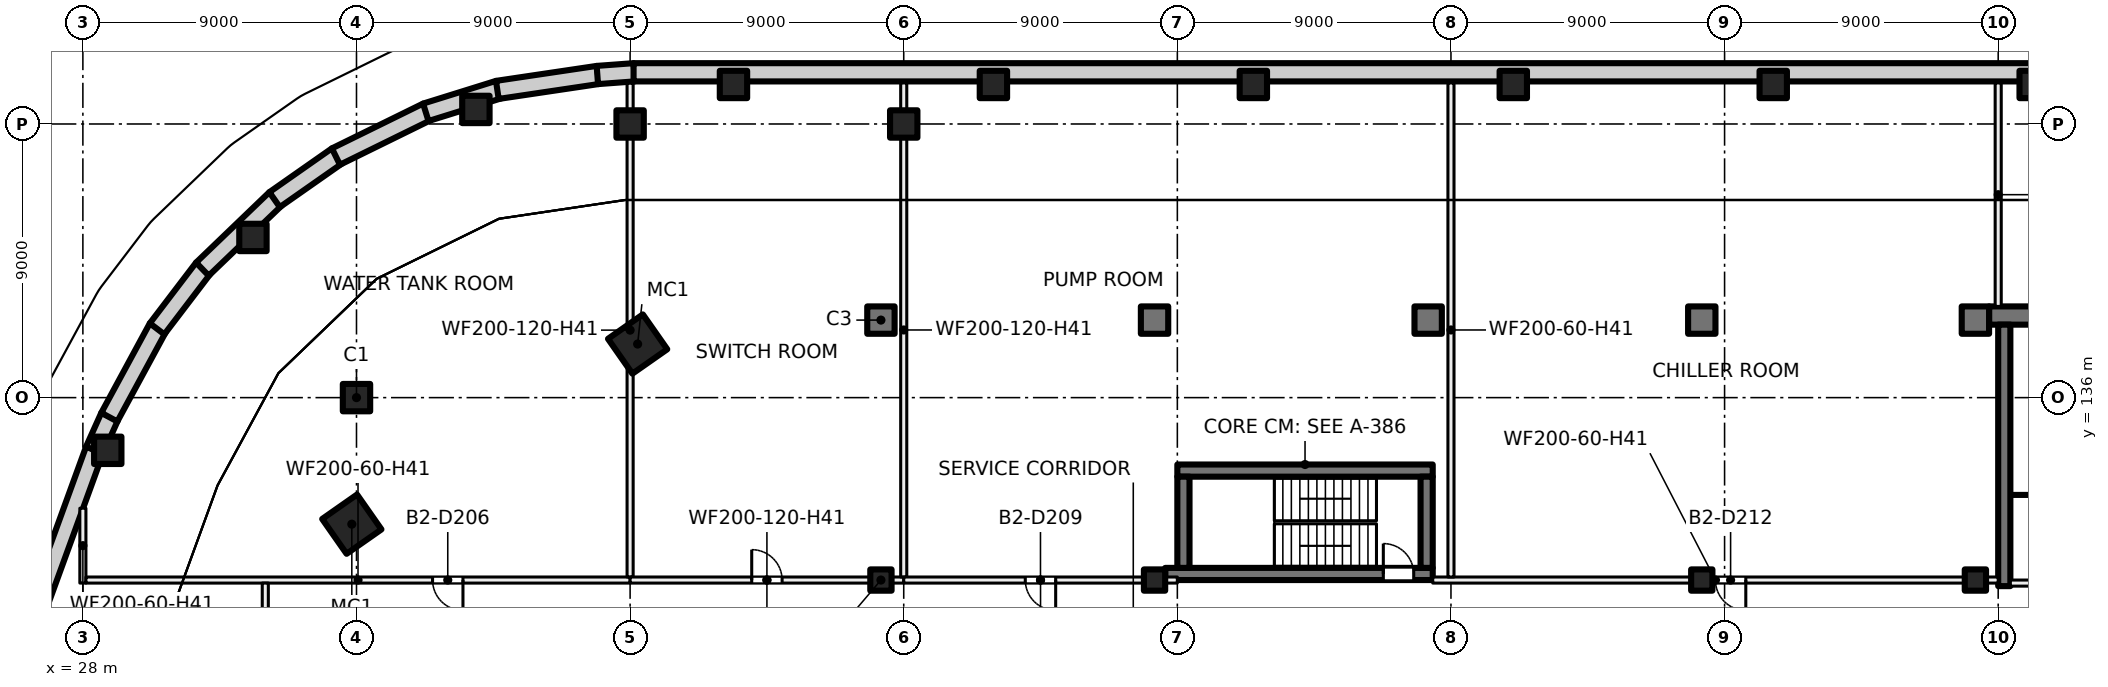
"""IFC4 building model, lengths in metres.
Left out: names, types, materials, properties, quantities, classifications, styles, units other than length and angle.
Written with IfcOpenShell. Run it as: python <this file> out.ifc"""

import sys

from ifc_helpers import new_model, si_unit, direction, frame, frame_2d, origin, origin_2d, place, context, subcontext, project, spatial, rectangle, hollow_rectangle, extrude, element, fill, save


model = new_model("IFC4")
c1 = context("Model", 3, precision=1e-05, world=origin(), true_north=direction((0.0, 1.0)))
c2 = subcontext(c1, "Body", "Model", "MODEL_VIEW")
j1 = project(units=[si_unit("LENGTHUNIT", "METRE"), si_unit("PLANEANGLEUNIT", "RADIAN")], contexts=[c1])
p1 = place(None, origin())
s1 = spatial("IfcSite", under=j1, at=p1, CompositionType="ELEMENT")
p2 = place(p1, origin())
s2 = spatial("IfcBuilding", under=s1, at=p2, CompositionType="ELEMENT")
p3 = place(p2, frame((0.0, 0.0, -9.0)))
s3 = spatial("IfcBuildingStorey", under=s2, at=p3, CompositionType="ELEMENT", Elevation=-9.0)
p4 = place(p3, frame((12.199, 89.809, 0.0), z_axis=(0.0, 0.0, 1.0), x_axis=(0.342018444468, 0.939693239118, 0.0)))
e1 = element("IfcWall", 1, at=p4, inside=s3, PredefinedType="SHEAR", context=c2, shape_type="SweptSolid", body=[
    extrude(rectangle(XDim=47.334, YDim=0.6, at=frame_2d((23.667, 0.0))), origin(), (0.0, 0.0, 1.0), 4.5),
])
p5 = place(p3, frame((28.38, 134.268, 0.0), z_axis=(0.0, 0.0, 1.0), x_axis=(0.410489806774, 0.911865186601, 0.0)))
e2 = element("IfcWall", 2, at=p5, inside=s3, PredefinedType="SHEAR", context=c2, shape_type="SweptSolid", body=[
    extrude(rectangle(XDim=1.217, YDim=0.6, at=frame_2d((0.608, 0.0))), origin(), (0.0, 0.0, 1.0), 4.5),
])
p6 = place(p3, frame((28.87, 135.358, 0.0), z_axis=(0.0, 0.0, 1.0), x_axis=(0.476454595908, 0.879199077591, 0.0)))
e3 = element("IfcWall", 3, at=p6, inside=s3, PredefinedType="SHEAR", context=c2, shape_type="SweptSolid", body=[
    extrude(rectangle(XDim=3.349, YDim=0.6, at=frame_2d((1.674, 0.0))), origin(), (0.0, 0.0, 1.0), 4.5),
])
p7 = place(p3, frame((30.441, 138.263, 0.0), z_axis=(0.0, 0.0, 1.0), x_axis=(0.606063715653, 0.79541610027, 0.0)))
e4 = element("IfcWall", 4, at=p7, inside=s3, PredefinedType="SHEAR", context=c2, shape_type="SweptSolid", body=[
    extrude(rectangle(XDim=2.512, YDim=0.6, at=frame_2d((1.256, 0.0))), origin(), (0.0, 0.0, 1.0), 4.5),
])
p8 = place(p3, frame((31.932, 140.226, 0.0), z_axis=(0.0, 0.0, 1.0), x_axis=(0.721212073243, 0.692714331747, 0.0)))
e5 = element("IfcWall", 5, at=p8, inside=s3, PredefinedType="SHEAR", context=c2, shape_type="SweptSolid", body=[
    extrude(rectangle(XDim=3.341, YDim=0.6, at=frame_2d((1.67, 0.0))), origin(), (0.0, 0.0, 1.0), 4.5),
])
p9 = place(p3, frame((34.306, 142.511, 0.0), z_axis=(0.0, 0.0, 1.0), x_axis=(0.819136010061, 0.57359933492, 0.0)))
e6 = element("IfcWall", 6, at=p9, inside=s3, PredefinedType="SHEAR", context=c2, shape_type="SweptSolid", body=[
    extrude(rectangle(XDim=2.512, YDim=0.6, at=frame_2d((1.256, 0.0))), origin(), (0.0, 0.0, 1.0), 4.5),
])
p10 = place(p3, frame((36.323, 143.928, 0.0), z_axis=(0.0, 0.0, 1.0), x_axis=(0.897590342017, 0.440830554656, 0.0)))
e7 = element("IfcWall", 7, at=p10, inside=s3, PredefinedType="SHEAR", context=c2, shape_type="SweptSolid", body=[
    extrude(rectangle(XDim=3.341, YDim=0.6, at=frame_2d((1.671, 0.0))), origin(), (0.0, 0.0, 1.0), 4.5),
])
p11 = place(p3, frame((39.28, 145.384, 0.0), z_axis=(0.0, 0.0, 1.0), x_axis=(0.954711451083, 0.297533267335, 0.0)))
e8 = element("IfcWall", 8, at=p11, inside=s3, PredefinedType="SHEAR", context=c2, shape_type="SweptSolid", body=[
    extrude(rectangle(XDim=2.512, YDim=0.6, at=frame_2d((1.256, 0.0))), origin(), (0.0, 0.0, 1.0), 4.5),
])
p12 = place(p3, frame((41.632, 146.121, 0.0), z_axis=(0.0, 0.0, 1.0), x_axis=(0.989117960185, 0.14712464389, 0.0)))
e9 = element("IfcWall", 9, at=p12, inside=s3, PredefinedType="SHEAR", context=c2, shape_type="SweptSolid", body=[
    extrude(rectangle(XDim=3.349, YDim=0.6, at=frame_2d((1.674, 0.0))), origin(), (0.0, 0.0, 1.0), 4.5),
])
p13 = place(p3, frame((44.923, 146.611, 0.0), z_axis=(0.0, 0.0, 1.0), x_axis=(0.99726994401, 0.073842120603, 0.0)))
e10 = element("IfcWall", 10, at=p13, inside=s3, PredefinedType="SHEAR", context=c2, shape_type="SweptSolid", body=[
    extrude(rectangle(XDim=1.217, YDim=0.6, at=frame_2d((0.608, 0.0))), origin(), (0.0, 0.0, 1.0), 4.5),
])
p14 = place(p3, frame((46.114, 146.7, 0.0), z_axis=(0.0, 0.0, 1.0), x_axis=(1.0, 0.0, 0.0)))
e11 = element("IfcWall", 11, at=p14, inside=s3, PredefinedType="SHEAR", context=c2, shape_type="SweptSolid", body=[
    extrude(rectangle(XDim=59.364, YDim=0.6, at=frame_2d((29.682, 0.0))), origin(), (0.0, 0.0, 1.0), 4.5),
])
for number, where, z_axis, x_axis in (
    (12, (37.0, 136.0, 0.0), (0.0, 0.0, 1.0), (1.0, 0.0, 0.0)),
    (13, (46.0, 145.0, 0.0), (0.0, 0.0, 1.0), (1.0, 0.0, 0.0)),
    (14, (55.0, 145.0, 0.0), (0.0, 0.0, 1.0), (1.0, 0.0, 0.0)),
    (15, (28.819, 134.267, 0.0), (0.0, 0.0, 1.0), (1.0, 0.0, 0.0)),
    (16, (33.594, 141.268, 0.0), (0.0, 0.0, 1.0), (1.0, 0.0, 0.0)),
    (17, (40.927, 145.479, 0.0), (0.0, 0.0, 1.0), (1.0, 0.0, 0.0)),
    (18, (49.4, 146.3, 0.0), (0.0, 0.0, 1.0), (1.0, 0.0, 0.0)),
    (19, (57.95, 146.3, 0.0), (0.0, 0.0, 1.0), (1.0, 0.0, 0.0)),
    (20, (66.5, 146.3, 0.0), (0.0, 0.0, 1.0), (1.0, 0.0, 0.0)),
    (21, (75.05, 146.3, 0.0), (0.0, 0.0, 1.0), (1.0, 0.0, 0.0)),
    (22, (83.6, 146.3, 0.0), (0.0, 0.0, 1.0), (1.0, 0.0, 0.0)),
    (23, (92.15, 146.3, 0.0), (0.0, 0.0, 1.0), (1.0, 0.0, 0.0)),
):
    element("IfcColumn", number, at=place(p3, frame(where, z_axis=z_axis, x_axis=x_axis)), inside=s3, PredefinedType="COLUMN", context=c2, shape_type="SweptSolid", body=[
        extrude(rectangle(XDim=0.9, YDim=0.9, at=origin_2d()), origin(), (0.0, 0.0, 1.0), 4.5),
    ])
for number, where, z_axis, x_axis in (
    (24, (36.846, 131.838, 0.0), (0.0, 0.0, 1.0), (0.574, -0.819, 0.0)),
    (25, (46.247, 137.762, 0.0), (0.0, 0.0, 1.0), (0.574, -0.819, 0.0)),
):
    element("IfcColumn", number, at=place(p3, frame(where, z_axis=z_axis, x_axis=x_axis)), inside=s3, PredefinedType="COLUMN", context=c2, shape_type="SweptSolid", body=[
        extrude(hollow_rectangle(XDim=1.4, YDim=1.4, WallThickness=0.04, at=origin_2d()), origin(), (0.0, 0.0, 1.0), 4.5),
    ])
for number, where, z_axis, x_axis in (
    (26, (54.25, 130.0, 0.0), (0.0, 0.0, 1.0), (1.0, 0.0, 0.0)),
    (27, (63.25, 130.0, 0.0), (0.0, 0.0, 1.0), (1.0, 0.0, 0.0)),
    (28, (81.25, 130.0, 0.0), (0.0, 0.0, 1.0), (1.0, 0.0, 0.0)),
    (29, (90.25, 130.0, 0.0), (0.0, 0.0, 1.0), (1.0, 0.0, 0.0)),
):
    element("IfcColumn", number, at=place(p3, frame(where, z_axis=z_axis, x_axis=x_axis)), inside=s3, PredefinedType="COLUMN", context=c2, shape_type="SweptSolid", body=[
        extrude(rectangle(XDim=0.7, YDim=0.7, at=origin_2d()), origin(), (0.0, 0.0, 1.0), 4.5),
    ])
for number, where, z_axis, x_axis in (
    (30, (54.25, 138.55, 0.0), (0.0, 0.0, 1.0), (1.0, 0.0, 0.0)),
    (31, (63.25, 138.55, 0.0), (0.0, 0.0, 1.0), (1.0, 0.0, 0.0)),
    (32, (72.25, 138.55, 0.0), (0.0, 0.0, 1.0), (1.0, 0.0, 0.0)),
    (33, (81.25, 138.55, 0.0), (0.0, 0.0, 1.0), (1.0, 0.0, 0.0)),
    (34, (90.25, 138.55, 0.0), (0.0, 0.0, 1.0), (1.0, 0.0, 0.0)),
):
    element("IfcColumn", number, at=place(p3, frame(where, z_axis=z_axis, x_axis=x_axis)), inside=s3, PredefinedType="COLUMN", context=c2, shape_type="SweptSolid", body=[
        extrude(rectangle(XDim=0.9, YDim=0.9, at=origin_2d()), origin(), (0.0, 0.0, 1.0), 4.5),
    ])
p15 = place(p3, frame((99.6, 138.7, 0.0), z_axis=(0.0, 0.0, 1.0), x_axis=(-1.0, 0.0, 0.0)))
e35 = element("IfcWall", 35, at=p15, inside=s3, PredefinedType="SHEAR", context=c2, shape_type="SweptSolid", body=[
    extrude(rectangle(XDim=8.9, YDim=0.6, at=frame_2d((4.45, 0.0))), origin(), (0.0, 0.0, 1.0), 4.5),
])
p16 = place(p3, frame((91.2, 138.4, 0.0), z_axis=(0.0, 0.0, 1.0), x_axis=(0.0, -1.0, 0.0)))
e36 = element("IfcWall", 36, at=p16, inside=s3, PredefinedType="SHEAR", context=c2, shape_type="SweptSolid", body=[
    extrude(rectangle(XDim=8.6, YDim=0.4, at=frame_2d((4.3, 0.0))), origin(), (0.0, 0.0, 1.0), 4.5),
])
p17 = place(p3, frame((63.6, 130.2, 0.0), z_axis=(0.0, 0.0, 1.0), x_axis=(1.0, 0.0, 0.0)))
e37 = element("IfcWall", 37, at=p17, inside=s3, PredefinedType="SHEAR", context=c2, shape_type="SweptSolid", body=[
    extrude(rectangle(XDim=8.8, YDim=0.4, at=frame_2d((4.4, 0.0))), origin(), (0.0, 0.0, 1.0), 4.5),
])
p18 = place(p17, frame((7.175, 0.0, 0.0)))
e38 = element("IfcOpeningElement", 38, at=p18, cuts=e37, PredefinedType="OPENING", context=c2, shape_type="SweptSolid", body=[
    extrude(rectangle(XDim=1.0, YDim=2.1, at=frame_2d((0.5, 1.05))), frame((0.0, 0.21, 0.0), z_axis=(0.0, -1.0, 0.0), x_axis=(1.0, 0.0, 0.0)), (0.0, 0.0, 1.0), 0.42),
])
p19 = place(p3, frame((64.0, 133.6, 0.0), z_axis=(0.0, 0.0, 1.0), x_axis=(1.0, 0.0, 0.0)))
e39 = element("IfcWall", 39, at=p19, inside=s3, PredefinedType="SHEAR", context=c2, shape_type="SweptSolid", body=[
    extrude(rectangle(XDim=8.4, YDim=0.4, at=frame_2d((4.2, 0.0))), origin(), (0.0, 0.0, 1.0), 4.5),
])
for number, where, z_axis, x_axis in (
    (40, (64.2, 130.4, 0.0), (0.0, 0.0, 1.0), (0.0, 1.0, 0.0)),
    (41, (72.2, 130.4, 0.0), (0.0, 0.0, 1.0), (0.0, 1.0, 0.0)),
):
    element("IfcWall", number, at=place(p3, frame(where, z_axis=z_axis, x_axis=x_axis)), inside=s3, PredefinedType="SHEAR", context=c2, shape_type="SweptSolid", body=[
        extrude(rectangle(XDim=3.0, YDim=0.4, at=frame_2d((1.5, 0.0))), origin(), (0.0, 0.0, 1.0), 4.5),
    ])
p20 = place(p3, frame((91.4, 129.9, 0.0), z_axis=(0.0, 0.0, 1.0), x_axis=(1.0, 0.0, 0.0)))
e42 = element("IfcWall", 42, at=p20, inside=s3, PredefinedType="PARTITIONING", context=c2, shape_type="SweptSolid", body=[
    extrude(rectangle(XDim=3.8, YDim=0.2, at=frame_2d((1.9, 0.0))), origin(), (0.0, 0.0, 1.0), 4.125),
])
p21 = place(p20, frame((2.3, 0.0, 0.0)))
e43 = element("IfcOpeningElement", 43, at=p21, cuts=e42, PredefinedType="OPENING", context=c2, shape_type="SweptSolid", body=[
    extrude(rectangle(XDim=1.2, YDim=2.1, at=frame_2d((0.6, 1.05))), frame((0.0, 0.11, 0.0), z_axis=(0.0, -1.0, 0.0), x_axis=(1.0, 0.0, 0.0)), (0.0, 0.0, 1.0), 0.22),
])
p22 = place(p3, frame((91.4, 132.8, 0.0), z_axis=(0.0, 0.0, 1.0), x_axis=(1.0, 0.0, 0.0)))
e44 = element("IfcWall", 44, at=p22, inside=s3, PredefinedType="PARTITIONING", context=c2, shape_type="SweptSolid", body=[
    extrude(rectangle(XDim=1.95, YDim=0.1, at=frame_2d((0.975, 0.0))), origin(), (0.0, 0.0, 1.0), 4.125),
])
p23 = place(p3, frame((28.0, 129.9, 0.0), z_axis=(0.0, 0.0, 1.0), x_axis=(0.0, 1.0, 0.0)))
e45 = element("IfcWall", 45, at=p23, inside=s3, PredefinedType="PARTITIONING", context=c2, shape_type="SweptSolid", body=[
    extrude(rectangle(XDim=2.463, YDim=0.2, at=frame_2d((1.231, 0.0))), origin(), (0.0, 0.0, 1.0), 4.125),
])
p24 = place(p3, frame((28.1, 130.0, 0.0), z_axis=(0.0, 0.0, 1.0), x_axis=(1.0, 0.0, 0.0)))
e46 = element("IfcWall", 46, at=p24, inside=s3, PredefinedType="PARTITIONING", context=c2, shape_type="SweptSolid", body=[
    extrude(rectangle(XDim=17.9, YDim=0.2, at=frame_2d((8.95, 0.0))), origin(), (0.0, 0.0, 1.0), 4.125),
])
p25 = place(p24, frame((11.402, 0.0, 0.0)))
e47 = element("IfcOpeningElement", 47, at=p25, cuts=e46, PredefinedType="OPENING", context=c2, shape_type="SweptSolid", body=[
    extrude(rectangle(XDim=1.0, YDim=2.1, at=frame_2d((0.5, 1.05))), frame((0.0, 0.11, 0.0), z_axis=(0.0, -1.0, 0.0), x_axis=(1.0, 0.0, 0.0)), (0.0, 0.0, 1.0), 0.22),
])
p26 = place(p3, frame((34.0, 126.1, 0.0), z_axis=(0.0, 0.0, 1.0), x_axis=(0.0, 1.0, 0.0)))
e48 = element("IfcWall", 48, at=p26, inside=s3, PredefinedType="PARTITIONING", context=c2, shape_type="SweptSolid", body=[
    extrude(rectangle(XDim=3.8, YDim=0.2, at=frame_2d((1.9, 0.0))), origin(), (0.0, 0.0, 1.0), 4.125),
])
p27 = place(p3, frame((46.0, 130.1, 0.0), z_axis=(0.0, 0.0, 1.0), x_axis=(0.0, 1.0, 0.0)))
e49 = element("IfcWall", 49, at=p27, inside=s3, PredefinedType="PARTITIONING", context=c2, shape_type="SweptSolid", body=[
    extrude(rectangle(XDim=16.24, YDim=0.2, at=frame_2d((8.12, 0.0))), origin(), (0.0, 0.0, 1.0), 4.125),
])
p28 = place(p3, frame((46.0, 130.0, 0.0), z_axis=(0.0, 0.0, 1.0), x_axis=(1.0, 0.0, 0.0)))
e50 = element("IfcWall", 50, at=p28, inside=s3, PredefinedType="PARTITIONING", context=c2, shape_type="SweptSolid", body=[
    extrude(rectangle(XDim=9.0, YDim=0.2, at=frame_2d((4.5, 0.0))), origin(), (0.0, 0.0, 1.0), 4.125),
])
p29 = place(p28, frame((4.0, 0.0, 0.0)))
e51 = element("IfcOpeningElement", 51, at=p29, cuts=e50, PredefinedType="OPENING", context=c2, shape_type="SweptSolid", body=[
    extrude(rectangle(XDim=1.0, YDim=2.1, at=frame_2d((0.5, 1.05))), frame((0.0, 0.11, 0.0), z_axis=(0.0, -1.0, 0.0), x_axis=(1.0, 0.0, 0.0)), (0.0, 0.0, 1.0), 0.22),
])
p30 = place(p3, frame((55.0, 130.1, 0.0), z_axis=(0.0, 0.0, 1.0), x_axis=(0.0, 1.0, 0.0)))
e52 = element("IfcWall", 52, at=p30, inside=s3, PredefinedType="PARTITIONING", context=c2, shape_type="SweptSolid", body=[
    extrude(rectangle(XDim=16.25, YDim=0.2, at=frame_2d((8.125, 0.0))), origin(), (0.0, 0.0, 1.0), 4.125),
])
p31 = place(p3, frame((55.0, 130.0, 0.0), z_axis=(0.0, 0.0, 1.0), x_axis=(1.0, 0.0, 0.0)))
e53 = element("IfcWall", 53, at=p31, inside=s3, PredefinedType="PARTITIONING", context=c2, shape_type="SweptSolid", body=[
    extrude(rectangle(XDim=9.0, YDim=0.2, at=frame_2d((4.5, 0.0))), origin(), (0.0, 0.0, 1.0), 4.125),
])
p32 = place(p31, frame((3.998, 0.0, 0.0)))
e54 = element("IfcOpeningElement", 54, at=p32, cuts=e53, PredefinedType="OPENING", context=c2, shape_type="SweptSolid", body=[
    extrude(rectangle(XDim=1.0, YDim=2.1, at=frame_2d((0.5, 1.05))), frame((0.0, 0.11, 0.0), z_axis=(0.0, -1.0, 0.0), x_axis=(1.0, 0.0, 0.0)), (0.0, 0.0, 1.0), 0.22),
])
p33 = place(p3, frame((72.4, 130.0, 0.0), z_axis=(0.0, 0.0, 1.0), x_axis=(1.0, 0.0, 0.0)))
e55 = element("IfcWall", 55, at=p33, inside=s3, PredefinedType="PARTITIONING", context=c2, shape_type="SweptSolid", body=[
    extrude(rectangle(XDim=18.6, YDim=0.2, at=frame_2d((9.3, 0.0))), origin(), (0.0, 0.0, 1.0), 4.125),
])
p34 = place(p33, frame((9.298, 0.0, 0.0)))
e56 = element("IfcOpeningElement", 56, at=p34, cuts=e55, PredefinedType="OPENING", context=c2, shape_type="SweptSolid", body=[
    extrude(rectangle(XDim=1.0, YDim=2.1, at=frame_2d((0.5, 1.05))), frame((0.0, 0.11, 0.0), z_axis=(0.0, -1.0, 0.0), x_axis=(1.0, 0.0, 0.0)), (0.0, 0.0, 1.0), 0.22),
])
p35 = place(p3, frame((73.0, 130.1, 0.0), z_axis=(0.0, 0.0, 1.0), x_axis=(0.0, 1.0, 0.0)))
e57 = element("IfcWall", 57, at=p35, inside=s3, PredefinedType="PARTITIONING", context=c2, shape_type="SweptSolid", body=[
    extrude(rectangle(XDim=16.25, YDim=0.2, at=frame_2d((8.125, 0.0))), origin(), (0.0, 0.0, 1.0), 4.125),
])
p36 = place(p3, frame((91.0, 139.0, 0.0), z_axis=(0.0, 0.0, 1.0), x_axis=(0.0, 1.0, 0.0)))
e58 = element("IfcWall", 58, at=p36, inside=s3, PredefinedType="PARTITIONING", context=c2, shape_type="SweptSolid", body=[
    extrude(rectangle(XDim=7.35, YDim=0.2, at=frame_2d((3.675, 0.0))), origin(), (0.0, 0.0, 1.0), 4.125),
])
p37 = place(p18, origin())
e59 = element("IfcDoor", 59, at=p37, inside=s3, OperationType="SINGLE_SWING_LEFT", PredefinedType="DOOR", context=c2, shape_type="SweptSolid", body=[
    extrude(rectangle(XDim=1.0, YDim=2.1, at=frame_2d((0.5, 1.05))), frame((0.0, 0.025, 0.0), z_axis=(0.0, -1.0, 0.0), x_axis=(1.0, 0.0, 0.0)), (0.0, 0.0, 1.0), 0.05),
])
fill(e38, e59)
p38 = place(p25, origin())
e60 = element("IfcDoor", 60, at=p38, inside=s3, OperationType="SINGLE_SWING_RIGHT", PredefinedType="DOOR", context=c2, shape_type="SweptSolid", body=[
    extrude(rectangle(XDim=1.0, YDim=2.1, at=frame_2d((0.5, 1.05))), frame((0.0, 0.025, 0.0), z_axis=(0.0, -1.0, 0.0), x_axis=(1.0, 0.0, 0.0)), (0.0, 0.0, 1.0), 0.05),
])
fill(e47, e60)
p39 = place(p29, origin())
e61 = element("IfcDoor", 61, at=p39, inside=s3, OperationType="SINGLE_SWING_LEFT", PredefinedType="DOOR", context=c2, shape_type="SweptSolid", body=[
    extrude(rectangle(XDim=1.0, YDim=2.1, at=frame_2d((0.5, 1.05))), frame((0.0, 0.025, 0.0), z_axis=(0.0, -1.0, 0.0), x_axis=(1.0, 0.0, 0.0)), (0.0, 0.0, 1.0), 0.05),
])
fill(e51, e61)
p40 = place(p32, origin())
e62 = element("IfcDoor", 62, at=p40, inside=s3, OperationType="SINGLE_SWING_RIGHT", PredefinedType="DOOR", context=c2, shape_type="SweptSolid", body=[
    extrude(rectangle(XDim=1.0, YDim=2.1, at=frame_2d((0.5, 1.05))), frame((0.0, 0.025, 0.0), z_axis=(0.0, -1.0, 0.0), x_axis=(1.0, 0.0, 0.0)), (0.0, 0.0, 1.0), 0.05),
])
fill(e54, e62)
p41 = place(p34, origin())
e63 = element("IfcDoor", 63, at=p41, inside=s3, OperationType="SINGLE_SWING_RIGHT", PredefinedType="DOOR", context=c2, shape_type="SweptSolid", body=[
    extrude(rectangle(XDim=1.0, YDim=2.1, at=frame_2d((0.5, 1.05))), frame((0.0, 0.025, 0.0), z_axis=(0.0, -1.0, 0.0), x_axis=(1.0, 0.0, 0.0)), (0.0, 0.0, 1.0), 0.05),
])
fill(e56, e63)
save(model, sys.argv[1])
